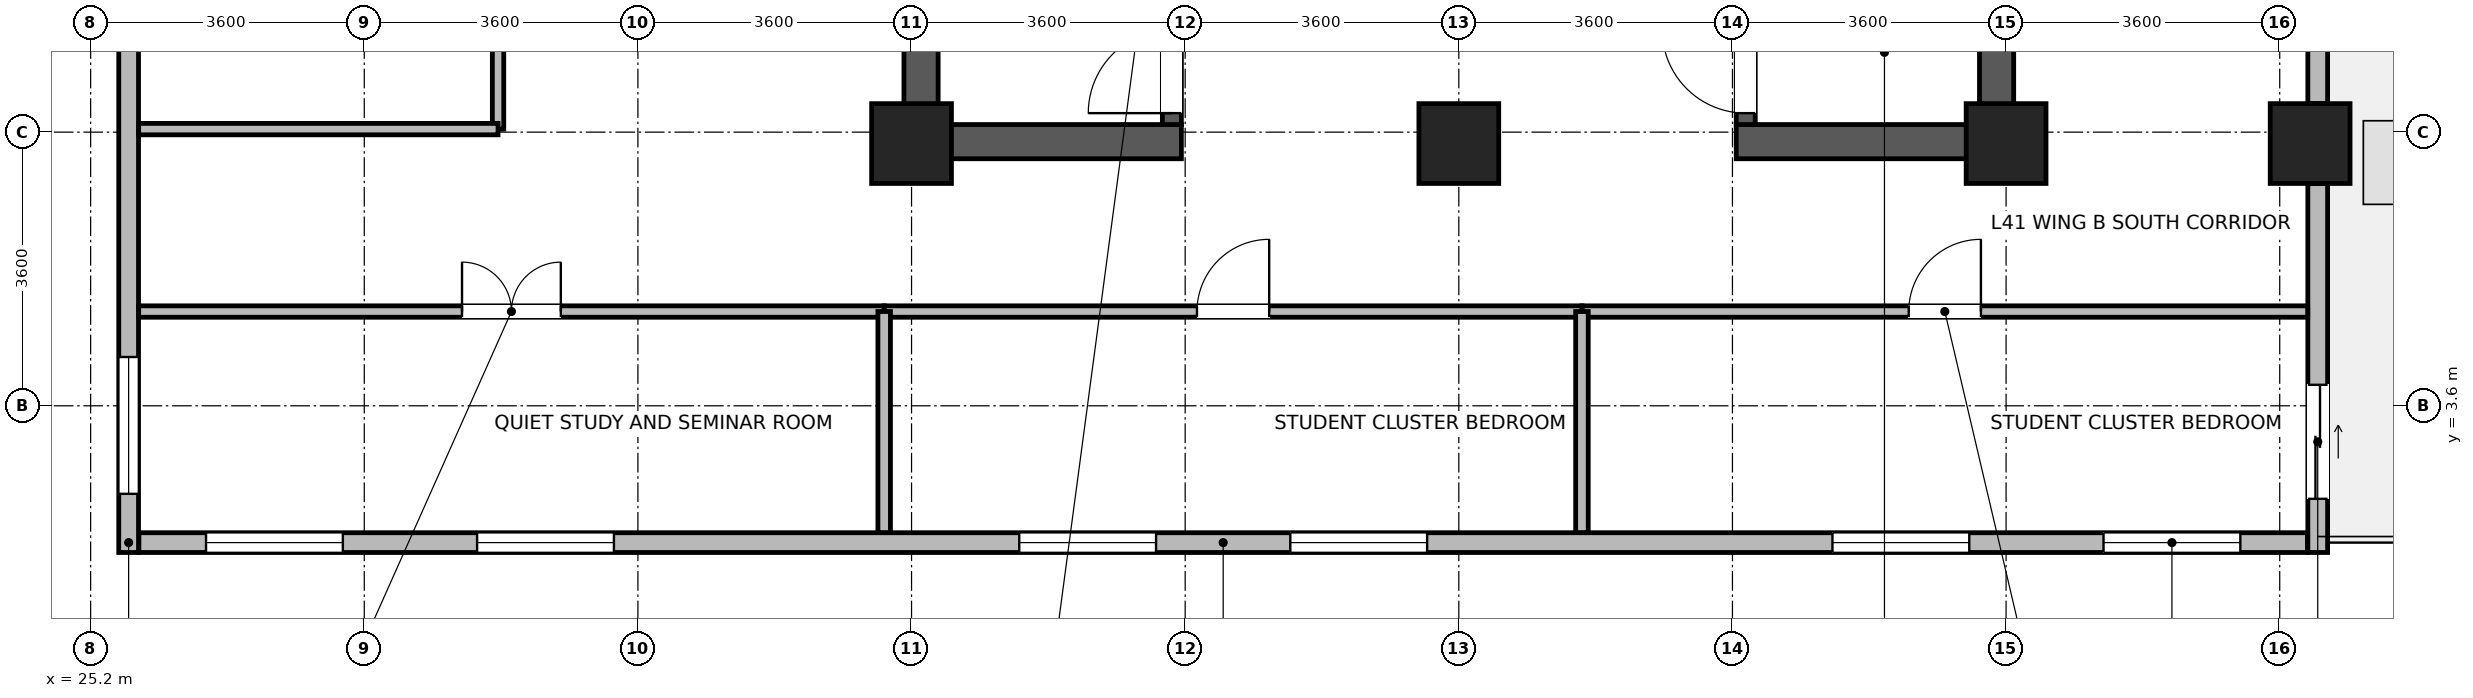
"""IFC4 building model, lengths in metres.
Left out: names, types, materials, properties, quantities, classifications, styles, units other than length and angle.
Written with IfcOpenShell. Run it as: python <this file> out.ifc"""

import sys

from ifc_helpers import new_model, si_unit, direction, frame, frame_2d, origin, origin_2d, place, context, subcontext, project, spatial, rectangle, extrude, source, transform, mapped, element, fill, save


model = new_model("IFC4")
c1 = context("Model", 3, precision=1e-05, world=origin(), true_north=direction((0.0, 1.0)))
c2 = subcontext(c1, "Body", "Model", "MODEL_VIEW")
j1 = project(units=[si_unit("LENGTHUNIT", "METRE"), si_unit("PLANEANGLEUNIT", "RADIAN")], contexts=[c1])
p1 = place(None, origin())
s1 = spatial("IfcSite", under=j1, at=p1, CompositionType="ELEMENT")
p2 = place(p1, origin())
s2 = spatial("IfcBuilding", under=s1, at=p2, CompositionType="ELEMENT")
p3 = place(p2, frame((0.0, 0.0, 162.4)))
s3 = spatial("IfcBuildingStorey", under=s2, at=p3, CompositionType="ELEMENT", Elevation=162.4)
for number, where, z_axis, x_axis in (
    (1, (36.125, 6.85, 0.0), (0.0, 0.0, 1.0), (0.0, 1.0, 0.0)),
    (2, (50.275, 6.85, 0.0), (0.0, 0.0, 1.0), (0.0, 1.0, 0.0)),
):
    element("IfcWall", number, at=place(p3, frame(where, z_axis=z_axis, x_axis=x_axis)), inside=s3, PredefinedType="SHEAR", context=c2, shape_type="SweptSolid", body=[
        extrude(rectangle(XDim=7.9, YDim=0.45, at=frame_2d((3.95, 0.0))), origin(), (0.0, 0.0, 1.0), 3.46),
    ])
for number, where, z_axis, x_axis in (
    (3, (36.35, 7.075, 0.0), (0.0, 0.0, 1.0), (1.0, 0.0, 0.0)),
    (4, (46.85, 7.075, 0.0), (0.0, 0.0, 1.0), (1.0, 0.0, 0.0)),
):
    element("IfcWall", number, at=place(p3, frame(where, z_axis=z_axis, x_axis=x_axis)), inside=s3, PredefinedType="SHEAR", context=c2, shape_type="SweptSolid", body=[
        extrude(rectangle(XDim=3.2, YDim=0.45, at=frame_2d((1.6, 0.0))), origin(), (0.0, 0.0, 1.0), 3.46),
    ])
p4 = place(p3, frame((39.425, 7.3, 0.0), z_axis=(0.0, 0.0, 1.0), x_axis=(0.0, 1.0, 0.0)))
e5 = element("IfcWall", 5, at=p4, inside=s3, PredefinedType="SHEAR", context=c2, shape_type="SweptSolid", body=[
    extrude(rectangle(XDim=7.0, YDim=0.25, at=frame_2d((3.5, 0.0))), origin(), (0.0, 0.0, 1.0), 3.46),
])
p5 = place(p4, frame((0.15, 0.0, 0.0)))
e6 = element("IfcOpeningElement", 6, at=p5, cuts=e5, PredefinedType="OPENING", context=c2, shape_type="SweptSolid", body=[
    extrude(rectangle(XDim=1.1, YDim=2.08, at=frame_2d((0.55, 1.04))), frame((0.0, 0.135, 0.0), z_axis=(0.0, -1.0, 0.0), x_axis=(1.0, 0.0, 0.0)), (0.0, 0.0, 1.0), 0.27),
])
p6 = place(p3, frame((46.975, 7.3, 0.0), z_axis=(0.0, 0.0, 1.0), x_axis=(0.0, 1.0, 0.0)))
e7 = element("IfcWall", 7, at=p6, inside=s3, PredefinedType="SHEAR", context=c2, shape_type="SweptSolid", body=[
    extrude(rectangle(XDim=7.0, YDim=0.25, at=frame_2d((3.5, 0.0))), origin(), (0.0, 0.0, 1.0), 3.46),
])
p7 = place(p6, frame((0.15, 0.0, 0.0)))
e8 = element("IfcOpeningElement", 8, at=p7, cuts=e7, PredefinedType="OPENING", context=c2, shape_type="SweptSolid", body=[
    extrude(rectangle(XDim=1.1, YDim=2.08, at=frame_2d((0.55, 1.04))), frame((0.0, 0.135, 0.0), z_axis=(0.0, -1.0, 0.0), x_axis=(1.0, 0.0, 0.0)), (0.0, 0.0, 1.0), 0.27),
])
m1 = source(origin(), c2, "Body", "SweptSolid", [
    extrude(rectangle(XDim=1.05, YDim=1.05, at=origin_2d()), origin(), (0.0, 0.0, 1.0), 3.7),
])
for number, where, z_axis, x_axis in (
    (9, (36.0, 7.05, 0.0), (0.0, 0.0, 1.0), (1.0, 0.0, 0.0)),
    (10, (43.2, 7.05, 0.0), (0.0, 0.0, 1.0), (1.0, 0.0, 0.0)),
    (11, (50.4, 7.05, 0.0), (0.0, 0.0, 1.0), (1.0, 0.0, 0.0)),
    (12, (54.4, 7.05, 0.0), (0.0, 0.0, 1.0), (1.0, 0.0, 0.0)),
):
    element("IfcColumn", number, at=place(p3, frame(where, z_axis=z_axis, x_axis=x_axis)), inside=s3, PredefinedType="COLUMN", context=c2, shape_type="MappedRepresentation", body=[
        mapped(m1, transform((0.0, 0.0, 0.0), x_axis=(1.0, 0.0, 0.0), y_axis=(0.0, 1.0, 0.0), z_axis=(0.0, 0.0, 1.0), scale=1.0)),
    ])
p8 = place(p3, frame((54.365, 1.8, 0.0), z_axis=(0.0, 0.0, 1.0), x_axis=(-1.0, 0.0, 0.0)))
e13 = element("IfcWall", 13, at=p8, inside=s3, PredefinedType="STANDARD", context=c2, shape_type="SweptSolid", body=[
    extrude(rectangle(XDim=28.53, YDim=0.26, at=frame_2d((14.265, 0.0))), origin(), (0.0, 0.0, 1.0), 3.44),
])
p9 = place(p8, frame((0.883, 0.0, 0.85)))
e14 = element("IfcOpeningElement", 14, at=p9, cuts=e13, PredefinedType="OPENING", context=c2, shape_type="SweptSolid", body=[
    extrude(rectangle(XDim=1.8, YDim=1.85, at=frame_2d((0.9, 0.925))), frame((0.0, 0.14, 0.0), z_axis=(0.0, -1.0, 0.0), x_axis=(1.0, 0.0, 0.0)), (0.0, 0.0, 1.0), 0.28),
])
p10 = place(p8, frame((4.449, 0.0, 0.85)))
e15 = element("IfcOpeningElement", 15, at=p10, cuts=e13, PredefinedType="OPENING", context=c2, shape_type="SweptSolid", body=[
    extrude(rectangle(XDim=1.8, YDim=1.85, at=frame_2d((0.9, 0.925))), frame((0.0, 0.14, 0.0), z_axis=(0.0, -1.0, 0.0), x_axis=(1.0, 0.0, 0.0)), (0.0, 0.0, 1.0), 0.28),
])
p11 = place(p8, frame((11.582, 0.0, 0.85)))
e16 = element("IfcOpeningElement", 16, at=p11, cuts=e13, PredefinedType="OPENING", context=c2, shape_type="SweptSolid", body=[
    extrude(rectangle(XDim=1.8, YDim=1.85, at=frame_2d((0.9, 0.925))), frame((0.0, 0.14, 0.0), z_axis=(0.0, -1.0, 0.0), x_axis=(1.0, 0.0, 0.0)), (0.0, 0.0, 1.0), 0.28),
])
p12 = place(p8, frame((15.148, 0.0, 0.85)))
e17 = element("IfcOpeningElement", 17, at=p12, cuts=e13, PredefinedType="OPENING", context=c2, shape_type="SweptSolid", body=[
    extrude(rectangle(XDim=1.8, YDim=1.85, at=frame_2d((0.9, 0.925))), frame((0.0, 0.14, 0.0), z_axis=(0.0, -1.0, 0.0), x_axis=(1.0, 0.0, 0.0)), (0.0, 0.0, 1.0), 0.28),
])
p13 = place(p8, frame((22.281, 0.0, 0.85)))
e18 = element("IfcOpeningElement", 18, at=p13, cuts=e13, PredefinedType="OPENING", context=c2, shape_type="SweptSolid", body=[
    extrude(rectangle(XDim=1.8, YDim=1.85, at=frame_2d((0.9, 0.925))), frame((0.0, 0.14, 0.0), z_axis=(0.0, -1.0, 0.0), x_axis=(1.0, 0.0, 0.0)), (0.0, 0.0, 1.0), 0.28),
])
p14 = place(p8, frame((25.847, 0.0, 0.85)))
e19 = element("IfcOpeningElement", 19, at=p14, cuts=e13, PredefinedType="OPENING", context=c2, shape_type="SweptSolid", body=[
    extrude(rectangle(XDim=1.8, YDim=1.85, at=frame_2d((0.9, 0.925))), frame((0.0, 0.14, 0.0), z_axis=(0.0, -1.0, 0.0), x_axis=(1.0, 0.0, 0.0)), (0.0, 0.0, 1.0), 0.28),
])
p15 = place(p3, frame((54.5, 6.524, 0.0), z_axis=(0.0, 0.0, 1.0), x_axis=(0.0, -1.0, 0.0)))
e20 = element("IfcWall", 20, at=p15, inside=s3, PredefinedType="STANDARD", context=c2, shape_type="SweptSolid", body=[
    extrude(rectangle(XDim=4.854, YDim=0.26, at=frame_2d((2.427, 0.0))), origin(), (0.0, 0.0, 1.0), 3.44),
])
p16 = place(p15, frame((2.648, 0.0, 0.0)))
e21 = element("IfcOpeningElement", 21, at=p16, cuts=e20, PredefinedType="OPENING", context=c2, shape_type="SweptSolid", body=[
    extrude(rectangle(XDim=1.5, YDim=2.15, at=frame_2d((0.75, 1.075))), frame((0.0, 0.14, 0.0), z_axis=(0.0, -1.0, 0.0), x_axis=(1.0, 0.0, 0.0)), (0.0, 0.0, 1.0), 0.28),
])
p17 = place(p3, frame((54.5, 14.024, 0.0), z_axis=(0.0, 0.0, 1.0), x_axis=(0.0, -1.0, 0.0)))
e22 = element("IfcWall", 22, at=p17, inside=s3, PredefinedType="STANDARD", context=c2, shape_type="SweptSolid", body=[
    extrude(rectangle(XDim=6.448, YDim=0.26, at=frame_2d((3.224, 0.0))), origin(), (0.0, 0.0, 1.0), 2.99),
])
p18 = place(p17, frame((3.936, 0.0, 0.85)))
e23 = element("IfcOpeningElement", 23, at=p18, cuts=e22, PredefinedType="OPENING", context=c2, shape_type="SweptSolid", body=[
    extrude(rectangle(XDim=1.8, YDim=1.85, at=frame_2d((0.9, 0.925))), frame((0.0, 0.14, 0.0), z_axis=(0.0, -1.0, 0.0), x_axis=(1.0, 0.0, 0.0)), (0.0, 0.0, 1.0), 0.28),
])
p19 = place(p17, frame((1.15, 0.0, 0.85)))
e24 = element("IfcOpeningElement", 24, at=p19, cuts=e22, PredefinedType="OPENING", context=c2, shape_type="SweptSolid", body=[
    extrude(rectangle(XDim=0.95, YDim=1.75, at=frame_2d((0.475, 0.875))), frame((0.0, 0.14, 0.0), z_axis=(0.0, -1.0, 0.0), x_axis=(1.0, 0.0, 0.0)), (0.0, 0.0, 1.0), 0.28),
])
p20 = place(p3, frame((25.7, 1.67, 0.0), z_axis=(0.0, 0.0, 1.0), x_axis=(0.0, 1.0, 0.0)))
e25 = element("IfcWall", 25, at=p20, inside=s3, PredefinedType="STANDARD", context=c2, shape_type="SweptSolid", body=[
    extrude(rectangle(XDim=20.06, YDim=0.26, at=frame_2d((10.03, 0.0))), origin(), (0.0, 0.0, 1.0), 3.44),
])
p21 = place(p20, frame((0.772, 0.0, 0.85)))
e26 = element("IfcOpeningElement", 26, at=p21, cuts=e25, PredefinedType="OPENING", context=c2, shape_type="SweptSolid", body=[
    extrude(rectangle(XDim=1.8, YDim=1.85, at=frame_2d((0.9, 0.925))), frame((0.0, 0.14, 0.0), z_axis=(0.0, -1.0, 0.0), x_axis=(1.0, 0.0, 0.0)), (0.0, 0.0, 1.0), 0.28),
])
p22 = place(p20, frame((7.458, 0.0, 0.85)))
e27 = element("IfcOpeningElement", 27, at=p22, cuts=e25, PredefinedType="OPENING", context=c2, shape_type="SweptSolid", body=[
    extrude(rectangle(XDim=1.8, YDim=1.85, at=frame_2d((0.9, 0.925))), frame((0.0, 0.14, 0.0), z_axis=(0.0, -1.0, 0.0), x_axis=(1.0, 0.0, 0.0)), (0.0, 0.0, 1.0), 0.28),
])
p23 = place(p20, frame((14.145, 0.0, 0.85)))
e28 = element("IfcOpeningElement", 28, at=p23, cuts=e25, PredefinedType="OPENING", context=c2, shape_type="SweptSolid", body=[
    extrude(rectangle(XDim=1.8, YDim=1.85, at=frame_2d((0.9, 0.925))), frame((0.0, 0.14, 0.0), z_axis=(0.0, -1.0, 0.0), x_axis=(1.0, 0.0, 0.0)), (0.0, 0.0, 1.0), 0.28),
])
p24 = place(p20, frame((17.488, 0.0, 0.85)))
e29 = element("IfcOpeningElement", 29, at=p24, cuts=e25, PredefinedType="OPENING", context=c2, shape_type="SweptSolid", body=[
    extrude(rectangle(XDim=1.8, YDim=1.85, at=frame_2d((0.9, 0.925))), frame((0.0, 0.14, 0.0), z_axis=(0.0, -1.0, 0.0), x_axis=(1.0, 0.0, 0.0)), (0.0, 0.0, 1.0), 0.28),
])
p25 = place(p3, frame((25.832, 4.84, 0.0), z_axis=(0.0, 0.0, 1.0), x_axis=(1.0, 0.0, 0.0)))
e30 = element("IfcWall", 30, at=p25, inside=s3, PredefinedType="PARTITIONING", context=c2, shape_type="SweptSolid", body=[
    extrude(rectangle(XDim=9.808, YDim=0.15, at=frame_2d((4.904, 0.0))), origin(), (0.0, 0.0, 1.0), 3.44),
])
p26 = place(p25, frame((4.254, 0.0, 0.0)))
e31 = element("IfcOpeningElement", 31, at=p26, cuts=e30, PredefinedType="OPENING", context=c2, shape_type="SweptSolid", body=[
    extrude(rectangle(XDim=1.3, YDim=2.12, at=frame_2d((0.65, 1.06))), frame((0.0, 0.085, 0.0), z_axis=(0.0, -1.0, 0.0), x_axis=(1.0, 0.0, 0.0)), (0.0, 0.0, 1.0), 0.17),
])
p27 = place(p3, frame((44.82, 4.84, 0.0), z_axis=(0.0, 0.0, 1.0), x_axis=(1.0, 0.0, 0.0)))
e32 = element("IfcWall", 32, at=p27, inside=s3, PredefinedType="PARTITIONING", context=c2, shape_type="SweptSolid", body=[
    extrude(rectangle(XDim=9.548, YDim=0.15, at=frame_2d((4.774, 0.0))), origin(), (0.0, 0.0, 1.0), 3.44),
])
p28 = place(p27, frame((4.299, 0.0, 0.0)))
e33 = element("IfcOpeningElement", 33, at=p28, cuts=e32, PredefinedType="OPENING", context=c2, shape_type="SweptSolid", body=[
    extrude(rectangle(XDim=0.95, YDim=2.1, at=frame_2d((0.475, 1.05))), frame((0.0, 0.085, 0.0), z_axis=(0.0, -1.0, 0.0), x_axis=(1.0, 0.0, 0.0)), (0.0, 0.0, 1.0), 0.17),
])
p29 = place(p3, frame((35.64, 4.84, 0.0), z_axis=(0.0, 0.0, 1.0), x_axis=(1.0, 0.0, 0.0)))
e34 = element("IfcWall", 34, at=p29, inside=s3, PredefinedType="PARTITIONING", context=c2, shape_type="SweptSolid", body=[
    extrude(rectangle(XDim=9.18, YDim=0.15, at=frame_2d((4.59, 0.0))), origin(), (0.0, 0.0, 1.0), 3.44),
])
p30 = place(p29, frame((4.115, 0.0, 0.0)))
e35 = element("IfcOpeningElement", 35, at=p30, cuts=e34, PredefinedType="OPENING", context=c2, shape_type="SweptSolid", body=[
    extrude(rectangle(XDim=0.95, YDim=2.1, at=frame_2d((0.475, 1.05))), frame((0.0, 0.085, 0.0), z_axis=(0.0, -1.0, 0.0), x_axis=(1.0, 0.0, 0.0)), (0.0, 0.0, 1.0), 0.17),
])
p31 = place(p3, frame((30.56, 7.24, 0.0), z_axis=(0.0, 0.0, 1.0), x_axis=(0.0, 1.0, 0.0)))
e36 = element("IfcWall", 36, at=p31, inside=s3, PredefinedType="PARTITIONING", context=c2, shape_type="SweptSolid", body=[
    extrude(rectangle(XDim=7.26, YDim=0.15, at=frame_2d((3.63, 0.0))), origin(), (0.0, 0.0, 1.0), 3.44),
])
p32 = place(p31, frame((2.98, 0.0, 0.0)))
e37 = element("IfcOpeningElement", 37, at=p32, cuts=e36, PredefinedType="OPENING", context=c2, shape_type="SweptSolid", body=[
    extrude(rectangle(XDim=1.3, YDim=2.12, at=frame_2d((0.65, 1.06))), frame((0.0, 0.085, 0.0), z_axis=(0.0, -1.0, 0.0), x_axis=(1.0, 0.0, 0.0)), (0.0, 0.0, 1.0), 0.17),
])
p33 = place(p3, frame((25.832, 7.24, 0.0), z_axis=(0.0, 0.0, 1.0), x_axis=(1.0, 0.0, 0.0)))
e38 = element("IfcWall", 38, at=p33, inside=s3, PredefinedType="PARTITIONING", context=c2, shape_type="SweptSolid", body=[
    extrude(rectangle(XDim=4.728, YDim=0.15, at=frame_2d((2.364, 0.0))), origin(), (0.0, 0.0, 1.0), 3.44),
])
for number, where, z_axis, x_axis in (
    (39, (35.64, 1.932, 0.0), (0.0, 0.0, 1.0), (0.0, 1.0, 0.0)),
    (40, (44.82, 1.932, 0.0), (0.0, 0.0, 1.0), (0.0, 1.0, 0.0)),
):
    element("IfcWall", number, at=place(p3, frame(where, z_axis=z_axis, x_axis=x_axis)), inside=s3, PredefinedType="PARTITIONING", context=c2, shape_type="SweptSolid", body=[
        extrude(rectangle(XDim=2.908, YDim=0.165, at=frame_2d((1.454, 0.0))), origin(), (0.0, 0.0, 1.0), 3.44),
    ])
p34 = place(p9, origin())
e41 = element("IfcWindow", 41, at=p34, inside=s3, PartitioningType="SINGLE_PANEL", PredefinedType="WINDOW", context=c2, shape_type="SweptSolid", body=[
    extrude(rectangle(XDim=1.8, YDim=1.85, at=frame_2d((0.9, 0.925))), frame((0.0, 0.03, 0.0), z_axis=(0.0, -1.0, 0.0), x_axis=(1.0, 0.0, 0.0)), (0.0, 0.0, 1.0), 0.06),
])
fill(e14, e41)
p35 = place(p10, origin())
e42 = element("IfcWindow", 42, at=p35, inside=s3, PartitioningType="SINGLE_PANEL", PredefinedType="WINDOW", context=c2, shape_type="SweptSolid", body=[
    extrude(rectangle(XDim=1.8, YDim=1.85, at=frame_2d((0.9, 0.925))), frame((0.0, 0.03, 0.0), z_axis=(0.0, -1.0, 0.0), x_axis=(1.0, 0.0, 0.0)), (0.0, 0.0, 1.0), 0.06),
])
fill(e15, e42)
p36 = place(p11, origin())
e43 = element("IfcWindow", 43, at=p36, inside=s3, PartitioningType="SINGLE_PANEL", PredefinedType="WINDOW", context=c2, shape_type="SweptSolid", body=[
    extrude(rectangle(XDim=1.8, YDim=1.85, at=frame_2d((0.9, 0.925))), frame((0.0, 0.03, 0.0), z_axis=(0.0, -1.0, 0.0), x_axis=(1.0, 0.0, 0.0)), (0.0, 0.0, 1.0), 0.06),
])
fill(e16, e43)
p37 = place(p12, origin())
e44 = element("IfcWindow", 44, at=p37, inside=s3, PartitioningType="SINGLE_PANEL", PredefinedType="WINDOW", context=c2, shape_type="SweptSolid", body=[
    extrude(rectangle(XDim=1.8, YDim=1.85, at=frame_2d((0.9, 0.925))), frame((0.0, 0.03, 0.0), z_axis=(0.0, -1.0, 0.0), x_axis=(1.0, 0.0, 0.0)), (0.0, 0.0, 1.0), 0.06),
])
fill(e17, e44)
p38 = place(p13, origin())
e45 = element("IfcWindow", 45, at=p38, inside=s3, PartitioningType="SINGLE_PANEL", PredefinedType="WINDOW", context=c2, shape_type="SweptSolid", body=[
    extrude(rectangle(XDim=1.8, YDim=1.85, at=frame_2d((0.9, 0.925))), frame((0.0, 0.03, 0.0), z_axis=(0.0, -1.0, 0.0), x_axis=(1.0, 0.0, 0.0)), (0.0, 0.0, 1.0), 0.06),
])
fill(e18, e45)
p39 = place(p14, origin())
e46 = element("IfcWindow", 46, at=p39, inside=s3, PartitioningType="SINGLE_PANEL", PredefinedType="WINDOW", context=c2, shape_type="SweptSolid", body=[
    extrude(rectangle(XDim=1.8, YDim=1.85, at=frame_2d((0.9, 0.925))), frame((0.0, 0.03, 0.0), z_axis=(0.0, -1.0, 0.0), x_axis=(1.0, 0.0, 0.0)), (0.0, 0.0, 1.0), 0.06),
])
fill(e19, e46)
p40 = place(p16, origin())
e47 = element("IfcDoor", 47, at=p40, inside=s3, OperationType="SLIDING_TO_LEFT", PredefinedType="DOOR", context=c2, shape_type="SweptSolid", body=[
    extrude(rectangle(XDim=1.5, YDim=2.15, at=frame_2d((0.75, 1.075))), frame((0.0, 0.025, 0.0), z_axis=(0.0, -1.0, 0.0), x_axis=(1.0, 0.0, 0.0)), (0.0, 0.0, 1.0), 0.05),
])
fill(e21, e47)
p41 = place(p21, origin())
e48 = element("IfcWindow", 48, at=p41, inside=s3, PartitioningType="SINGLE_PANEL", PredefinedType="WINDOW", context=c2, shape_type="SweptSolid", body=[
    extrude(rectangle(XDim=1.8, YDim=1.85, at=frame_2d((0.9, 0.925))), frame((0.0, 0.03, 0.0), z_axis=(0.0, -1.0, 0.0), x_axis=(1.0, 0.0, 0.0)), (0.0, 0.0, 1.0), 0.06),
])
fill(e26, e48)
p42 = place(p5, origin())
e49 = element("IfcDoor", 49, at=p42, inside=s3, OperationType="SINGLE_SWING_LEFT", PredefinedType="DOOR", context=c2, shape_type="SweptSolid", body=[
    extrude(rectangle(XDim=1.1, YDim=2.08, at=frame_2d((0.55, 1.04))), frame((0.0, 0.025, 0.0), z_axis=(0.0, -1.0, 0.0), x_axis=(1.0, 0.0, 0.0)), (0.0, 0.0, 1.0), 0.05),
])
fill(e6, e49)
p43 = place(p7, origin())
e50 = element("IfcDoor", 50, at=p43, inside=s3, OperationType="SINGLE_SWING_RIGHT", PredefinedType="DOOR", context=c2, shape_type="SweptSolid", body=[
    extrude(rectangle(XDim=1.1, YDim=2.08, at=frame_2d((0.55, 1.04))), frame((0.0, 0.025, 0.0), z_axis=(0.0, -1.0, 0.0), x_axis=(1.0, 0.0, 0.0)), (0.0, 0.0, 1.0), 0.05),
])
fill(e8, e50)
p44 = place(p26, origin())
e51 = element("IfcDoor", 51, at=p44, inside=s3, OperationType="DOUBLE_DOOR_SINGLE_SWING", PredefinedType="DOOR", context=c2, shape_type="SweptSolid", body=[
    extrude(rectangle(XDim=1.3, YDim=2.12, at=frame_2d((0.65, 1.06))), frame((0.0, 0.025, 0.0), z_axis=(0.0, -1.0, 0.0), x_axis=(1.0, 0.0, 0.0)), (0.0, 0.0, 1.0), 0.05),
])
fill(e31, e51)
p45 = place(p28, origin())
e52 = element("IfcDoor", 52, at=p45, inside=s3, OperationType="SINGLE_SWING_RIGHT", PredefinedType="DOOR", context=c2, shape_type="SweptSolid", body=[
    extrude(rectangle(XDim=0.95, YDim=2.1, at=frame_2d((0.475, 1.05))), frame((0.0, 0.025, 0.0), z_axis=(0.0, -1.0, 0.0), x_axis=(1.0, 0.0, 0.0)), (0.0, 0.0, 1.0), 0.05),
])
fill(e33, e52)
p46 = place(p30, origin())
e53 = element("IfcDoor", 53, at=p46, inside=s3, OperationType="SINGLE_SWING_RIGHT", PredefinedType="DOOR", context=c2, shape_type="SweptSolid", body=[
    extrude(rectangle(XDim=0.95, YDim=2.1, at=frame_2d((0.475, 1.05))), frame((0.0, 0.025, 0.0), z_axis=(0.0, -1.0, 0.0), x_axis=(1.0, 0.0, 0.0)), (0.0, 0.0, 1.0), 0.05),
])
fill(e35, e53)
save(model, sys.argv[1])
